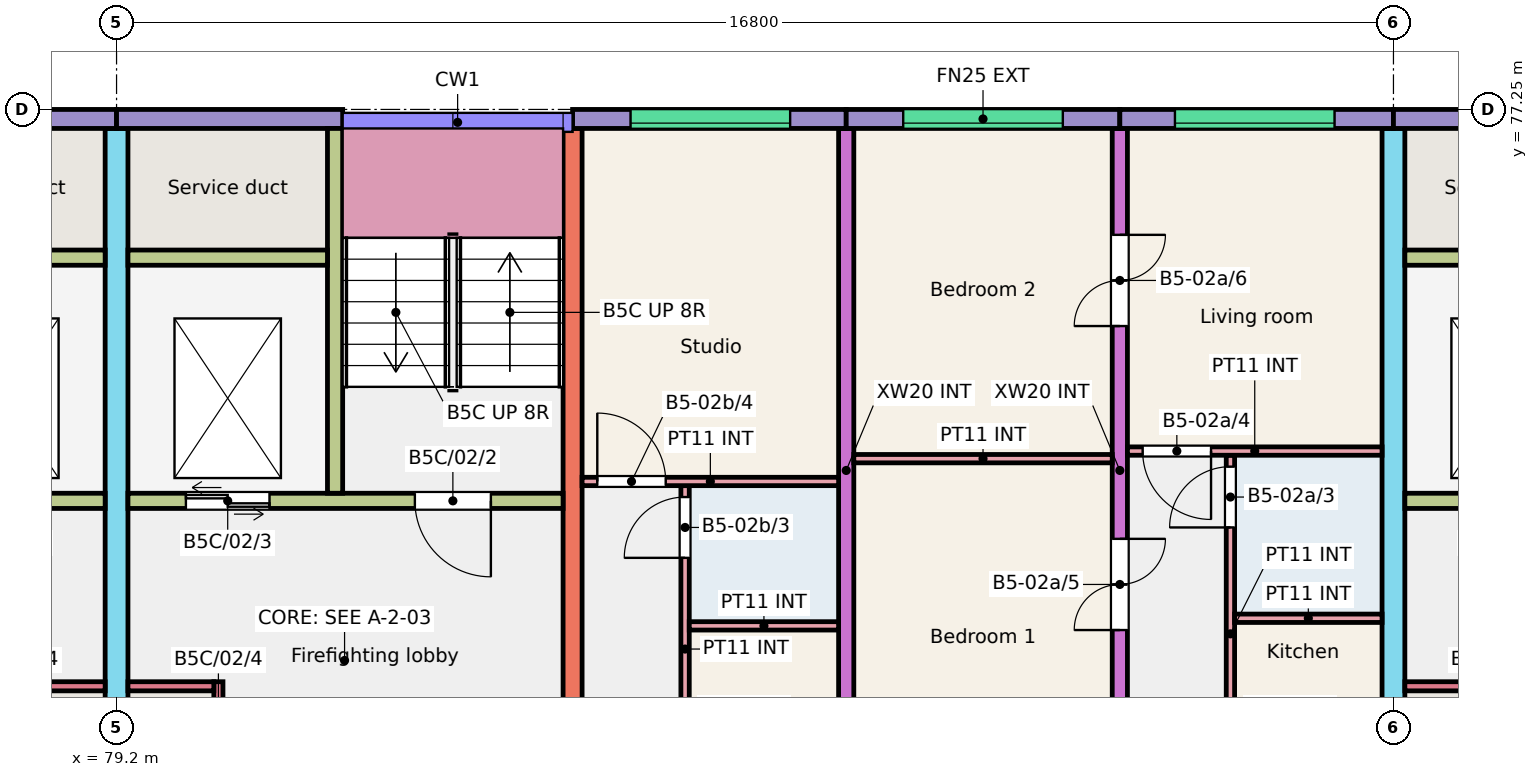
"""IFC4 building model, lengths in metres.
Left out: names, types, materials, properties, quantities, classifications, styles, units other than length and angle.
Written with IfcOpenShell. Run it as: python <this file> out.ifc"""

import sys

from ifc_helpers import new_model, si_unit, direction, frame, frame_2d, origin, place, context, subcontext, project, spatial, rectangle, extrude, element, fill, save


model = new_model("IFC4")
c1 = context("Model", 3, precision=1e-05, world=origin(), true_north=direction((0.0, 1.0)))
c2 = subcontext(c1, "Body", "Model", "MODEL_VIEW")
j1 = project(units=[si_unit("LENGTHUNIT", "METRE"), si_unit("PLANEANGLEUNIT", "RADIAN")], contexts=[c1])
p1 = place(None, origin())
s1 = spatial("IfcSite", under=j1, at=p1, CompositionType="ELEMENT")
p2 = place(p1, origin())
s2 = spatial("IfcBuilding", under=s1, at=p2, CompositionType="ELEMENT")
p3 = place(p2, frame((0.0, 0.0, 6.0)))
s3 = spatial("IfcBuildingStorey", under=s2, at=p3, CompositionType="ELEMENT", Elevation=6.0)
p4 = place(p3, frame((79.2, 66.0, 0.0), z_axis=(0.0, 0.0, 1.0), x_axis=(0.0, 1.0, 0.0)))
e1 = element("IfcWall", 1, at=p4, inside=s3, PredefinedType="SHEAR", context=c2, shape_type="SweptSolid", body=[
    extrude(rectangle(XDim=11.0, YDim=0.3, at=frame_2d((5.5, 0.0))), origin(), (0.0, 0.0, 1.0), 3.0),
])
p5 = place(p4, frame((0.3, 0.0, 0.0)))
e2 = element("IfcOpeningElement", 2, at=p5, cuts=e1, PredefinedType="OPENING", context=c2, shape_type="SweptSolid", body=[
    extrude(rectangle(XDim=1.2, YDim=2.1, at=frame_2d((0.6, 1.05))), frame((0.0, 0.16, 0.0), z_axis=(0.0, -1.0, 0.0), x_axis=(1.0, 0.0, 0.0)), (0.0, 0.0, 1.0), 0.32),
])
p6 = place(p3, frame((85.2, 68.0, 0.0), z_axis=(0.0, 0.0, 1.0), x_axis=(0.0, 1.0, 0.0)))
e3 = element("IfcWall", 3, at=p6, inside=s3, PredefinedType="SHEAR", context=c2, shape_type="SweptSolid", body=[
    extrude(rectangle(XDim=9.0, YDim=0.25, at=frame_2d((4.5, 0.0))), origin(), (0.0, 0.0, 1.0), 3.0),
])
p7 = place(p3, frame((88.8, 68.0, 0.0), z_axis=(0.0, 0.0, 1.0), x_axis=(0.0, 1.0, 0.0)))
e4 = element("IfcWall", 4, at=p7, inside=s3, PredefinedType="SHEAR", context=c2, shape_type="SweptSolid", body=[
    extrude(rectangle(XDim=9.0, YDim=0.2, at=frame_2d((4.5, 0.0))), origin(), (0.0, 0.0, 1.0), 3.0),
])
p8 = place(p3, frame((92.4, 68.0, 0.0), z_axis=(0.0, 0.0, 1.0), x_axis=(0.0, 1.0, 0.0)))
e5 = element("IfcWall", 5, at=p8, inside=s3, PredefinedType="SHEAR", context=c2, shape_type="SweptSolid", body=[
    extrude(rectangle(XDim=9.0, YDim=0.2, at=frame_2d((4.5, 0.0))), origin(), (0.0, 0.0, 1.0), 3.0),
])
p9 = place(p8, frame((2.4, 0.0, 0.0)))
e6 = element("IfcOpeningElement", 6, at=p9, cuts=e5, PredefinedType="OPENING", context=c2, shape_type="SweptSolid", body=[
    extrude(rectangle(XDim=1.2, YDim=2.1, at=frame_2d((0.6, 1.05))), frame((0.0, 0.11, 0.0), z_axis=(0.0, -1.0, 0.0), x_axis=(1.0, 0.0, 0.0)), (0.0, 0.0, 1.0), 0.22),
])
p10 = place(p8, frame((6.4, 0.0, 0.0)))
e7 = element("IfcOpeningElement", 7, at=p10, cuts=e5, PredefinedType="OPENING", context=c2, shape_type="SweptSolid", body=[
    extrude(rectangle(XDim=1.2, YDim=2.1, at=frame_2d((0.6, 1.05))), frame((0.0, 0.11, 0.0), z_axis=(0.0, -1.0, 0.0), x_axis=(1.0, 0.0, 0.0)), (0.0, 0.0, 1.0), 0.22),
])
p11 = place(p3, frame((96.0, 66.0, 0.0), z_axis=(0.0, 0.0, 1.0), x_axis=(0.0, 1.0, 0.0)))
e8 = element("IfcWall", 8, at=p11, inside=s3, PredefinedType="SHEAR", context=c2, shape_type="SweptSolid", body=[
    extrude(rectangle(XDim=11.0, YDim=0.3, at=frame_2d((5.5, 0.0))), origin(), (0.0, 0.0, 1.0), 3.0),
])
p12 = place(p11, frame((0.3, 0.0, 0.0)))
e9 = element("IfcOpeningElement", 9, at=p12, cuts=e8, PredefinedType="OPENING", context=c2, shape_type="SweptSolid", body=[
    extrude(rectangle(XDim=1.2, YDim=2.1, at=frame_2d((0.6, 1.05))), frame((0.0, 0.16, 0.0), z_axis=(0.0, -1.0, 0.0), x_axis=(1.0, 0.0, 0.0)), (0.0, 0.0, 1.0), 0.32),
])
p13 = place(p3, frame((76.225, 77.125, 0.0), z_axis=(0.0, 0.0, 1.0), x_axis=(1.0, 0.0, 0.0)))
e10 = element("IfcWall", 10, at=p13, inside=s3, PredefinedType="SOLIDWALL", context=c2, shape_type="SweptSolid", body=[
    extrude(rectangle(XDim=2.975, YDim=0.25, at=frame_2d((1.487, 0.0))), origin(), (0.0, 0.0, 1.0), 3.0),
])
p14 = place(p3, frame((73.325, 72.1, 0.0), z_axis=(0.0, 0.0, 1.0), x_axis=(1.0, 0.0, 0.0)))
e11 = element("IfcWall", 11, at=p14, inside=s3, PredefinedType="SHEAR", context=c2, shape_type="SweptSolid", body=[
    extrude(rectangle(XDim=5.725, YDim=0.2, at=frame_2d((2.863, 0.0))), origin(), (0.0, 0.0, 1.0), 3.0),
])
p15 = place(p14, frame((0.95, 0.0, 0.0)))
e12 = element("IfcOpeningElement", 12, at=p15, cuts=e11, PredefinedType="OPENING", context=c2, shape_type="SweptSolid", body=[
    extrude(rectangle(XDim=1.0, YDim=2.1, at=frame_2d((0.5, 1.05))), frame((0.0, 0.11, 0.0), z_axis=(0.0, -1.0, 0.0), x_axis=(1.0, 0.0, 0.0)), (0.0, 0.0, 1.0), 0.22),
])
p16 = place(p14, frame((3.863, 0.0, 0.0)))
e13 = element("IfcOpeningElement", 13, at=p16, cuts=e11, PredefinedType="OPENING", context=c2, shape_type="SweptSolid", body=[
    extrude(rectangle(XDim=1.1, YDim=2.1, at=frame_2d((0.55, 1.05))), frame((0.0, 0.11, 0.0), z_axis=(0.0, -1.0, 0.0), x_axis=(1.0, 0.0, 0.0)), (0.0, 0.0, 1.0), 0.22),
])
p17 = place(p3, frame((76.425, 75.3, 0.0), z_axis=(0.0, 0.0, 1.0), x_axis=(1.0, 0.0, 0.0)))
e14 = element("IfcWall", 14, at=p17, inside=s3, PredefinedType="SHEAR", context=c2, shape_type="SweptSolid", body=[
    extrude(rectangle(XDim=2.625, YDim=0.2, at=frame_2d((1.312, 0.0))), origin(), (0.0, 0.0, 1.0), 3.0),
])
p18 = place(p3, frame((77.92, 69.66, 0.0), z_axis=(0.0, 0.0, 1.0), x_axis=(1.0, 0.0, 0.0)))
e15 = element("IfcWall", 15, at=p18, inside=s3, PredefinedType="SHEAR", context=c2, shape_type="SweptSolid", body=[
    extrude(rectangle(XDim=1.13, YDim=0.12, at=frame_2d((0.565, 0.0))), origin(), (0.0, 0.0, 1.0), 3.0),
])
p19 = place(p3, frame((79.2, 77.125, 0.0), z_axis=(0.0, 0.0, 1.0), x_axis=(1.0, 0.0, 0.0)))
e16 = element("IfcWall", 16, at=p19, inside=s3, PredefinedType="SOLIDWALL", context=c2, shape_type="SweptSolid", body=[
    extrude(rectangle(XDim=2.975, YDim=0.25, at=frame_2d((1.488, 0.0))), origin(), (0.0, 0.0, 1.0), 3.0),
])
p20 = place(p3, frame((79.35, 72.1, 0.0), z_axis=(0.0, 0.0, 1.0), x_axis=(1.0, 0.0, 0.0)))
e17 = element("IfcWall", 17, at=p20, inside=s3, PredefinedType="SHEAR", context=c2, shape_type="SweptSolid", body=[
    extrude(rectangle(XDim=5.725, YDim=0.2, at=frame_2d((2.862, 0.0))), origin(), (0.0, 0.0, 1.0), 3.0),
])
p21 = place(p20, frame((3.775, 0.0, 0.0)))
e18 = element("IfcOpeningElement", 18, at=p21, cuts=e17, PredefinedType="OPENING", context=c2, shape_type="SweptSolid", body=[
    extrude(rectangle(XDim=1.0, YDim=2.1, at=frame_2d((0.5, 1.05))), frame((0.0, 0.11, 0.0), z_axis=(0.0, -1.0, 0.0), x_axis=(1.0, 0.0, 0.0)), (0.0, 0.0, 1.0), 0.22),
])
p22 = place(p20, frame((0.762, 0.0, 0.0)))
e19 = element("IfcOpeningElement", 19, at=p22, cuts=e17, PredefinedType="OPENING", context=c2, shape_type="SweptSolid", body=[
    extrude(rectangle(XDim=1.1, YDim=2.1, at=frame_2d((0.55, 1.05))), frame((0.0, 0.11, 0.0), z_axis=(0.0, -1.0, 0.0), x_axis=(1.0, 0.0, 0.0)), (0.0, 0.0, 1.0), 0.22),
])
p23 = place(p3, frame((82.075, 72.2, 0.0), z_axis=(0.0, 0.0, 1.0), x_axis=(0.0, 1.0, 0.0)))
e20 = element("IfcWall", 20, at=p23, inside=s3, PredefinedType="SHEAR", context=c2, shape_type="SweptSolid", body=[
    extrude(rectangle(XDim=4.8, YDim=0.2, at=frame_2d((2.4, 0.0))), origin(), (0.0, 0.0, 1.0), 3.0),
])
p24 = place(p3, frame((79.35, 75.3, 0.0), z_axis=(0.0, 0.0, 1.0), x_axis=(1.0, 0.0, 0.0)))
e21 = element("IfcWall", 21, at=p24, inside=s3, PredefinedType="SHEAR", context=c2, shape_type="SweptSolid", body=[
    extrude(rectangle(XDim=2.625, YDim=0.2, at=frame_2d((1.312, 0.0))), origin(), (0.0, 0.0, 1.0), 3.0),
])
p25 = place(p3, frame((80.54, 68.0, 0.0), z_axis=(0.0, 0.0, 1.0), x_axis=(0.0, 1.0, 0.0)))
e22 = element("IfcWall", 22, at=p25, inside=s3, PredefinedType="SHEAR", context=c2, shape_type="SweptSolid", body=[
    extrude(rectangle(XDim=1.72, YDim=0.12, at=frame_2d((0.86, 0.0))), origin(), (0.0, 0.0, 1.0), 3.0),
])
p26 = place(p25, frame((0.45, 0.0, 0.0)))
e23 = element("IfcOpeningElement", 23, at=p26, cuts=e22, PredefinedType="OPENING", context=c2, shape_type="SweptSolid", body=[
    extrude(rectangle(XDim=0.9, YDim=2.1, at=frame_2d((0.45, 1.05))), frame((0.0, 0.07, 0.0), z_axis=(0.0, -1.0, 0.0), x_axis=(1.0, 0.0, 0.0)), (0.0, 0.0, 1.0), 0.14),
])
p27 = place(p3, frame((79.35, 69.66, 0.0), z_axis=(0.0, 0.0, 1.0), x_axis=(1.0, 0.0, 0.0)))
e24 = element("IfcWall", 24, at=p27, inside=s3, PredefinedType="SHEAR", context=c2, shape_type="SweptSolid", body=[
    extrude(rectangle(XDim=1.13, YDim=0.12, at=frame_2d((0.565, 0.0))), origin(), (0.0, 0.0, 1.0), 3.0),
])
p28 = place(p3, frame((85.2, 77.125, 0.0), z_axis=(0.0, 0.0, 1.0), x_axis=(1.0, 0.0, 0.0)))
e25 = element("IfcWall", 25, at=p28, inside=s3, PredefinedType="SOLIDWALL", context=c2, shape_type="SweptSolid", body=[
    extrude(rectangle(XDim=3.6, YDim=0.25, at=frame_2d((1.8, 0.0))), origin(), (0.0, 0.0, 1.0), 3.0),
])
p29 = place(p28, frame((0.762, 0.0, 1.2)))
e26 = element("IfcOpeningElement", 26, at=p29, cuts=e25, PredefinedType="OPENING", context=c2, shape_type="SweptSolid", body=[
    extrude(rectangle(XDim=2.1, YDim=1.2, at=frame_2d((1.05, 0.6))), frame((0.0, 0.135, 0.0), z_axis=(0.0, -1.0, 0.0), x_axis=(1.0, 0.0, 0.0)), (0.0, 0.0, 1.0), 0.27),
])
p30 = place(p3, frame((88.8, 77.125, 0.0), z_axis=(0.0, 0.0, 1.0), x_axis=(1.0, 0.0, 0.0)))
e27 = element("IfcWall", 27, at=p30, inside=s3, PredefinedType="SOLIDWALL", context=c2, shape_type="SweptSolid", body=[
    extrude(rectangle(XDim=3.6, YDim=0.25, at=frame_2d((1.8, 0.0))), origin(), (0.0, 0.0, 1.0), 3.0),
])
p31 = place(p30, frame((0.75, 0.0, 1.2)))
e28 = element("IfcOpeningElement", 28, at=p31, cuts=e27, PredefinedType="OPENING", context=c2, shape_type="SweptSolid", body=[
    extrude(rectangle(XDim=2.1, YDim=1.2, at=frame_2d((1.05, 0.6))), frame((0.0, 0.135, 0.0), z_axis=(0.0, -1.0, 0.0), x_axis=(1.0, 0.0, 0.0)), (0.0, 0.0, 1.0), 0.27),
])
p32 = place(p3, frame((92.4, 77.125, 0.0), z_axis=(0.0, 0.0, 1.0), x_axis=(1.0, 0.0, 0.0)))
e29 = element("IfcWall", 29, at=p32, inside=s3, PredefinedType="SOLIDWALL", context=c2, shape_type="SweptSolid", body=[
    extrude(rectangle(XDim=3.6, YDim=0.25, at=frame_2d((1.8, 0.0))), origin(), (0.0, 0.0, 1.0), 3.0),
])
p33 = place(p32, frame((0.725, 0.0, 1.2)))
e30 = element("IfcOpeningElement", 30, at=p33, cuts=e29, PredefinedType="OPENING", context=c2, shape_type="SweptSolid", body=[
    extrude(rectangle(XDim=2.1, YDim=1.2, at=frame_2d((1.05, 0.6))), frame((0.0, 0.135, 0.0), z_axis=(0.0, -1.0, 0.0), x_axis=(1.0, 0.0, 0.0)), (0.0, 0.0, 1.0), 0.27),
])
p34 = place(p3, frame((96.0, 77.125, 0.0), z_axis=(0.0, 0.0, 1.0), x_axis=(1.0, 0.0, 0.0)))
e31 = element("IfcWall", 31, at=p34, inside=s3, PredefinedType="SOLIDWALL", context=c2, shape_type="SweptSolid", body=[
    extrude(rectangle(XDim=2.975, YDim=0.25, at=frame_2d((1.488, 0.0))), origin(), (0.0, 0.0, 1.0), 3.0),
])
p35 = place(p3, frame((96.15, 72.1, 0.0), z_axis=(0.0, 0.0, 1.0), x_axis=(1.0, 0.0, 0.0)))
e32 = element("IfcWall", 32, at=p35, inside=s3, PredefinedType="SHEAR", context=c2, shape_type="SweptSolid", body=[
    extrude(rectangle(XDim=5.725, YDim=0.2, at=frame_2d((2.863, 0.0))), origin(), (0.0, 0.0, 1.0), 3.0),
])
p36 = place(p35, frame((3.775, 0.0, 0.0)))
e33 = element("IfcOpeningElement", 33, at=p36, cuts=e32, PredefinedType="OPENING", context=c2, shape_type="SweptSolid", body=[
    extrude(rectangle(XDim=1.0, YDim=2.1, at=frame_2d((0.5, 1.05))), frame((0.0, 0.11, 0.0), z_axis=(0.0, -1.0, 0.0), x_axis=(1.0, 0.0, 0.0)), (0.0, 0.0, 1.0), 0.22),
])
p37 = place(p35, frame((0.762, 0.0, 0.0)))
e34 = element("IfcOpeningElement", 34, at=p37, cuts=e32, PredefinedType="OPENING", context=c2, shape_type="SweptSolid", body=[
    extrude(rectangle(XDim=1.1, YDim=2.1, at=frame_2d((0.55, 1.05))), frame((0.0, 0.11, 0.0), z_axis=(0.0, -1.0, 0.0), x_axis=(1.0, 0.0, 0.0)), (0.0, 0.0, 1.0), 0.22),
])
p38 = place(p3, frame((96.15, 75.3, 0.0), z_axis=(0.0, 0.0, 1.0), x_axis=(1.0, 0.0, 0.0)))
e35 = element("IfcWall", 35, at=p38, inside=s3, PredefinedType="SHEAR", context=c2, shape_type="SweptSolid", body=[
    extrude(rectangle(XDim=2.625, YDim=0.2, at=frame_2d((1.312, 0.0))), origin(), (0.0, 0.0, 1.0), 3.0),
])
p39 = place(p3, frame((96.15, 69.66, 0.0), z_axis=(0.0, 0.0, 1.0), x_axis=(1.0, 0.0, 0.0)))
e36 = element("IfcWall", 36, at=p39, inside=s3, PredefinedType="SHEAR", context=c2, shape_type="SweptSolid", body=[
    extrude(rectangle(XDim=1.13, YDim=0.12, at=frame_2d((0.565, 0.0))), origin(), (0.0, 0.0, 1.0), 3.0),
])
p40 = place(p3, frame((93.855, 68.0, 0.0), z_axis=(0.0, 0.0, 1.0), x_axis=(0.0, 1.0, 0.0)))
e37 = element("IfcWall", 37, at=p40, inside=s3, PredefinedType="PARTITIONING", context=c2, shape_type="SweptSolid", body=[
    extrude(rectangle(XDim=4.7, YDim=0.11, at=frame_2d((2.35, 0.0))), origin(), (0.0, 0.0, 1.0), 2.8),
])
p41 = place(p40, frame((0.2, 0.0, 0.0)))
e38 = element("IfcOpeningElement", 38, at=p41, cuts=e37, PredefinedType="OPENING", context=c2, shape_type="SweptSolid", body=[
    extrude(rectangle(XDim=0.8, YDim=2.1, at=frame_2d((0.4, 1.05))), frame((0.0, 0.065, 0.0), z_axis=(0.0, -1.0, 0.0), x_axis=(1.0, 0.0, 0.0)), (0.0, 0.0, 1.0), 0.13),
])
p42 = place(p40, frame((3.75, 0.0, 0.0)))
e39 = element("IfcOpeningElement", 39, at=p42, cuts=e37, PredefinedType="OPENING", context=c2, shape_type="SweptSolid", body=[
    extrude(rectangle(XDim=0.8, YDim=2.1, at=frame_2d((0.4, 1.05))), frame((0.0, 0.065, 0.0), z_axis=(0.0, -1.0, 0.0), x_axis=(1.0, 0.0, 0.0)), (0.0, 0.0, 1.0), 0.13),
])
p43 = place(p3, frame((93.91, 70.555, 0.0), z_axis=(0.0, 0.0, 1.0), x_axis=(1.0, 0.0, 0.0)))
e40 = element("IfcWall", 40, at=p43, inside=s3, PredefinedType="PARTITIONING", context=c2, shape_type="SweptSolid", body=[
    extrude(rectangle(XDim=1.94, YDim=0.11, at=frame_2d((0.97, 0.0))), origin(), (0.0, 0.0, 1.0), 2.8),
])
p44 = place(p3, frame((92.5, 72.755, 0.0), z_axis=(0.0, 0.0, 1.0), x_axis=(1.0, 0.0, 0.0)))
e41 = element("IfcWall", 41, at=p44, inside=s3, PredefinedType="PARTITIONING", context=c2, shape_type="SweptSolid", body=[
    extrude(rectangle(XDim=3.35, YDim=0.11, at=frame_2d((1.675, 0.0))), origin(), (0.0, 0.0, 1.0), 2.8),
])
p45 = place(p44, frame((0.2, 0.0, 0.0)))
e42 = element("IfcOpeningElement", 42, at=p45, cuts=e41, PredefinedType="OPENING", context=c2, shape_type="SweptSolid", body=[
    extrude(rectangle(XDim=0.9, YDim=2.1, at=frame_2d((0.45, 1.05))), frame((0.0, 0.065, 0.0), z_axis=(0.0, -1.0, 0.0), x_axis=(1.0, 0.0, 0.0)), (0.0, 0.0, 1.0), 0.13),
])
p46 = place(p3, frame((88.9, 72.655, 0.0), z_axis=(0.0, 0.0, 1.0), x_axis=(1.0, 0.0, 0.0)))
e43 = element("IfcWall", 43, at=p46, inside=s3, PredefinedType="PARTITIONING", context=c2, shape_type="SweptSolid", body=[
    extrude(rectangle(XDim=3.4, YDim=0.11, at=frame_2d((1.7, 0.0))), origin(), (0.0, 0.0, 1.0), 2.8),
])
p47 = place(p3, frame((86.68, 68.0, 0.0), z_axis=(0.0, 0.0, 1.0), x_axis=(0.0, 1.0, 0.0)))
e44 = element("IfcWall", 44, at=p47, inside=s3, PredefinedType="PARTITIONING", context=c2, shape_type="SweptSolid", body=[
    extrude(rectangle(XDim=4.3, YDim=0.11, at=frame_2d((2.15, 0.0))), origin(), (0.0, 0.0, 1.0), 2.8),
])
p48 = place(p47, frame((0.2, 0.0, 0.0)))
e45 = element("IfcOpeningElement", 45, at=p48, cuts=e44, PredefinedType="OPENING", context=c2, shape_type="SweptSolid", body=[
    extrude(rectangle(XDim=0.8, YDim=2.1, at=frame_2d((0.4, 1.05))), frame((0.0, 0.065, 0.0), z_axis=(0.0, -1.0, 0.0), x_axis=(1.0, 0.0, 0.0)), (0.0, 0.0, 1.0), 0.13),
])
p49 = place(p47, frame((3.35, 0.0, 0.0)))
e46 = element("IfcOpeningElement", 46, at=p49, cuts=e44, PredefinedType="OPENING", context=c2, shape_type="SweptSolid", body=[
    extrude(rectangle(XDim=0.8, YDim=2.1, at=frame_2d((0.4, 1.05))), frame((0.0, 0.065, 0.0), z_axis=(0.0, -1.0, 0.0), x_axis=(1.0, 0.0, 0.0)), (0.0, 0.0, 1.0), 0.13),
])
p50 = place(p3, frame((86.735, 70.455, 0.0), z_axis=(0.0, 0.0, 1.0), x_axis=(1.0, 0.0, 0.0)))
e47 = element("IfcWall", 47, at=p50, inside=s3, PredefinedType="PARTITIONING", context=c2, shape_type="SweptSolid", body=[
    extrude(rectangle(XDim=1.965, YDim=0.11, at=frame_2d((0.982, 0.0))), origin(), (0.0, 0.0, 1.0), 2.8),
])
p51 = place(p3, frame((85.325, 72.355, 0.0), z_axis=(0.0, 0.0, 1.0), x_axis=(1.0, 0.0, 0.0)))
e48 = element("IfcWall", 48, at=p51, inside=s3, PredefinedType="PARTITIONING", context=c2, shape_type="SweptSolid", body=[
    extrude(rectangle(XDim=3.375, YDim=0.11, at=frame_2d((1.688, 0.0))), origin(), (0.0, 0.0, 1.0), 2.8),
])
p52 = place(p51, frame((0.2, 0.0, 0.0)))
e49 = element("IfcOpeningElement", 49, at=p52, cuts=e48, PredefinedType="OPENING", context=c2, shape_type="SweptSolid", body=[
    extrude(rectangle(XDim=0.9, YDim=2.1, at=frame_2d((0.45, 1.05))), frame((0.0, 0.065, 0.0), z_axis=(0.0, -1.0, 0.0), x_axis=(1.0, 0.0, 0.0)), (0.0, 0.0, 1.0), 0.13),
])
p53 = place(p31, origin())
e50 = element("IfcWindow", 50, at=p53, inside=s3, PartitioningType="SINGLE_PANEL", PredefinedType="WINDOW", context=c2, shape_type="SweptSolid", body=[
    extrude(rectangle(XDim=2.1, YDim=1.2, at=frame_2d((1.05, 0.6))), frame((0.0, -0.025, 0.0), z_axis=(0.0, -1.0, 0.0), x_axis=(1.0, 0.0, 0.0)), (0.0, 0.0, 1.0), 0.06),
])
fill(e28, e50)
p54 = place(p33, origin())
e51 = element("IfcWindow", 51, at=p54, inside=s3, PartitioningType="SINGLE_PANEL", PredefinedType="WINDOW", context=c2, shape_type="SweptSolid", body=[
    extrude(rectangle(XDim=2.1, YDim=1.2, at=frame_2d((1.05, 0.6))), frame((0.0, -0.025, 0.0), z_axis=(0.0, -1.0, 0.0), x_axis=(1.0, 0.0, 0.0)), (0.0, 0.0, 1.0), 0.06),
])
fill(e30, e51)
p55 = place(p29, origin())
e52 = element("IfcWindow", 52, at=p55, inside=s3, PartitioningType="SINGLE_PANEL", PredefinedType="WINDOW", context=c2, shape_type="SweptSolid", body=[
    extrude(rectangle(XDim=2.1, YDim=1.2, at=frame_2d((1.05, 0.6))), frame((0.0, -0.025, 0.0), z_axis=(0.0, -1.0, 0.0), x_axis=(1.0, 0.0, 0.0)), (0.0, 0.0, 1.0), 0.06),
])
fill(e26, e52)
p56 = place(p42, origin())
e53 = element("IfcDoor", 53, at=p56, inside=s3, OperationType="SINGLE_SWING_LEFT", PredefinedType="DOOR", context=c2, shape_type="SweptSolid", body=[
    extrude(rectangle(XDim=0.8, YDim=2.1, at=frame_2d((0.4, 1.05))), frame((0.0, 0.025, 0.0), z_axis=(0.0, -1.0, 0.0), x_axis=(1.0, 0.0, 0.0)), (0.0, 0.0, 1.0), 0.05),
])
fill(e39, e53)
p57 = place(p45, origin())
e54 = element("IfcDoor", 54, at=p57, inside=s3, OperationType="SINGLE_SWING_RIGHT", PredefinedType="DOOR", context=c2, shape_type="SweptSolid", body=[
    extrude(rectangle(XDim=0.9, YDim=2.1, at=frame_2d((0.45, 1.05))), frame((0.0, 0.025, 0.0), z_axis=(0.0, -1.0, 0.0), x_axis=(1.0, 0.0, 0.0)), (0.0, 0.0, 1.0), 0.05),
])
fill(e42, e54)
p58 = place(p9, origin())
e55 = element("IfcDoor", 55, at=p58, inside=s3, OperationType="DOUBLE_DOOR_SINGLE_SWING", PredefinedType="DOOR", context=c2, shape_type="SweptSolid", body=[
    extrude(rectangle(XDim=1.2, YDim=2.1, at=frame_2d((0.6, 1.05))), frame((0.0, 0.025, 0.0), z_axis=(0.0, -1.0, 0.0), x_axis=(1.0, 0.0, 0.0)), (0.0, 0.0, 1.0), 0.05),
])
fill(e6, e55)
p59 = place(p10, origin())
e56 = element("IfcDoor", 56, at=p59, inside=s3, OperationType="DOUBLE_DOOR_SINGLE_SWING", PredefinedType="DOOR", context=c2, shape_type="SweptSolid", body=[
    extrude(rectangle(XDim=1.2, YDim=2.1, at=frame_2d((0.6, 1.05))), frame((0.0, 0.025, 0.0), z_axis=(0.0, -1.0, 0.0), x_axis=(1.0, 0.0, 0.0)), (0.0, 0.0, 1.0), 0.05),
])
fill(e7, e56)
p60 = place(p49, origin())
e57 = element("IfcDoor", 57, at=p60, inside=s3, OperationType="SINGLE_SWING_LEFT", PredefinedType="DOOR", context=c2, shape_type="SweptSolid", body=[
    extrude(rectangle(XDim=0.8, YDim=2.1, at=frame_2d((0.4, 1.05))), frame((0.0, 0.025, 0.0), z_axis=(0.0, -1.0, 0.0), x_axis=(1.0, 0.0, 0.0)), (0.0, 0.0, 1.0), 0.05),
])
fill(e46, e57)
p61 = place(p52, origin())
e58 = element("IfcDoor", 58, at=p61, inside=s3, OperationType="SINGLE_SWING_LEFT", PredefinedType="DOOR", context=c2, shape_type="SweptSolid", body=[
    extrude(rectangle(XDim=0.9, YDim=2.1, at=frame_2d((0.45, 1.05))), frame((0.0, 0.025, 0.0), z_axis=(0.0, -1.0, 0.0), x_axis=(1.0, 0.0, 0.0)), (0.0, 0.0, 1.0), 0.05),
])
fill(e49, e58)
p62 = place(p21, origin())
e59 = element("IfcDoor", 59, at=p62, inside=s3, OperationType="SINGLE_SWING_RIGHT", PredefinedType="DOOR", context=c2, shape_type="SweptSolid", body=[
    extrude(rectangle(XDim=1.0, YDim=2.1, at=frame_2d((0.5, 1.05))), frame((0.0, 0.025, 0.0), z_axis=(0.0, -1.0, 0.0), x_axis=(1.0, 0.0, 0.0)), (0.0, 0.0, 1.0), 0.05),
])
fill(e18, e59)
p63 = place(p22, origin())
e60 = element("IfcDoor", 60, at=p63, inside=s3, OperationType="DOUBLE_DOOR_SLIDING", PredefinedType="DOOR", context=c2, shape_type="SweptSolid", body=[
    extrude(rectangle(XDim=1.1, YDim=2.1, at=frame_2d((0.55, 1.05))), frame((0.0, 0.025, 0.0), z_axis=(0.0, -1.0, 0.0), x_axis=(1.0, 0.0, 0.0)), (0.0, 0.0, 1.0), 0.05),
])
fill(e19, e60)
save(model, sys.argv[1])
